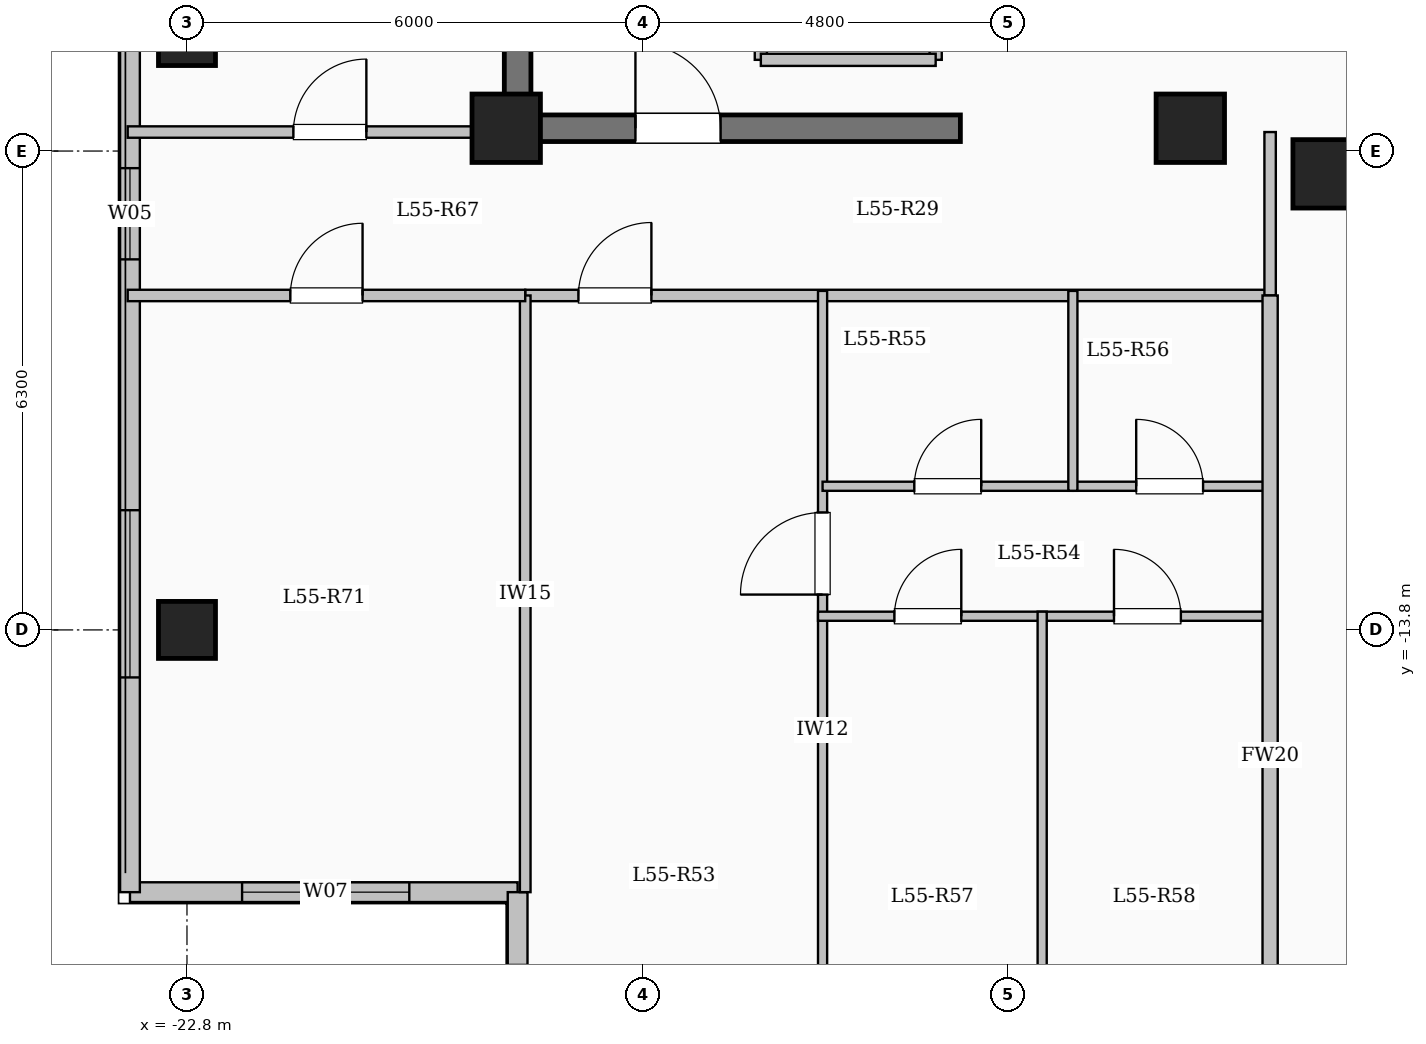
"""IFC4 building model, lengths in metres.
Left out: names, types, materials, properties, quantities, classifications, styles, units other than length and angle.
Written with IfcOpenShell. Run it as: python <this file> out.ifc"""

import sys

from ifc_helpers import new_model, si_unit, direction, frame, frame_2d, origin, origin_2d, place, context, subcontext, project, spatial, rectangle, extrude, element, fill, save


model = new_model("IFC4")
c1 = context("Model", 3, precision=1e-05, world=origin(), true_north=direction((0.0, 1.0)))
c2 = subcontext(c1, "Body", "Model", "MODEL_VIEW")
j1 = project(units=[si_unit("LENGTHUNIT", "METRE"), si_unit("PLANEANGLEUNIT", "RADIAN")], contexts=[c1])
p1 = place(None, origin())
s1 = spatial("IfcSite", under=j1, at=p1, CompositionType="ELEMENT")
p2 = place(p1, origin())
s2 = spatial("IfcBuilding", under=s1, at=p2, CompositionType="ELEMENT")
p3 = place(p2, frame((0.0, 0.0, 203.65)))
s3 = spatial("IfcBuildingStorey", under=s2, at=p3, CompositionType="ELEMENT", Elevation=203.65)
for number, where, z_axis, x_axis in (
    (1, (-7.8, -7.8, 0.0), (0.0, 0.0, 1.0), (1.0, 0.0, 0.0)),
    (2, (-9.6, -7.2, 0.0), (0.0, 0.0, 1.0), (1.0, 0.0, 0.0)),
    (3, (-18.6, -7.2, 0.0), (0.0, 0.0, 1.0), (1.0, 0.0, 0.0)),
):
    element("IfcColumn", number, at=place(p3, frame(where, z_axis=z_axis, x_axis=x_axis)), inside=s3, PredefinedType="COLUMN", context=c2, shape_type="SweptSolid", body=[
        extrude(rectangle(XDim=0.9, YDim=0.9, at=origin_2d()), origin(), (0.0, 0.0, 1.0), 3.35),
    ])
for number, where, z_axis, x_axis in (
    (4, (-22.8, -13.8, 0.0), (0.0, 0.0, 1.0), (1.0, 0.0, 0.0)),
    (5, (-22.8, -6.0, 0.0), (0.0, 0.0, 1.0), (1.0, 0.0, 0.0)),
):
    element("IfcColumn", number, at=place(p3, frame(where, z_axis=z_axis, x_axis=x_axis)), inside=s3, PredefinedType="COLUMN", context=c2, shape_type="SweptSolid", body=[
        extrude(rectangle(XDim=0.75, YDim=0.75, at=origin_2d()), origin(), (0.0, 0.0, 1.0), 3.35),
    ])
p4 = place(p3, frame((-18.45, -17.25, 0.0), z_axis=(0.0, 0.0, 1.0), x_axis=(-1.0, 0.0, 0.0)))
e6 = element("IfcWall", 6, at=p4, inside=s3, PredefinedType="SOLIDWALL", context=c2, shape_type="SweptSolid", body=[
    extrude(rectangle(XDim=5.1, YDim=0.26, at=frame_2d((2.55, 0.0))), origin(), (0.0, 0.0, 1.0), 3.1),
])
p5 = place(p4, frame((1.425, 0.0, 0.9)))
e7 = element("IfcOpeningElement", 7, at=p5, cuts=e6, PredefinedType="OPENING", context=c2, shape_type="SweptSolid", body=[
    extrude(rectangle(XDim=2.2, YDim=1.75, at=frame_2d((1.1, 0.875))), frame((0.0, 0.14, 0.0), z_axis=(0.0, -1.0, 0.0), x_axis=(1.0, 0.0, 0.0)), (0.0, 0.0, 1.0), 0.28),
])
p6 = place(p3, frame((-23.55, -17.25, 0.0), z_axis=(0.0, 0.0, 1.0), x_axis=(0.0, 1.0, 0.0)))
e8 = element("IfcWall", 8, at=p6, inside=s3, PredefinedType="SOLIDWALL", context=c2, shape_type="SweptSolid", body=[
    extrude(rectangle(XDim=34.5, YDim=0.26, at=frame_2d((17.25, 0.0))), origin(), (0.0, 0.0, 1.0), 3.1),
])
p7 = place(p6, frame((2.825, 0.0, 0.9)))
e9 = element("IfcOpeningElement", 9, at=p7, cuts=e8, PredefinedType="OPENING", context=c2, shape_type="SweptSolid", body=[
    extrude(rectangle(XDim=2.2, YDim=1.75, at=frame_2d((1.1, 0.875))), frame((0.0, 0.14, 0.0), z_axis=(0.0, -1.0, 0.0), x_axis=(1.0, 0.0, 0.0)), (0.0, 0.0, 1.0), 0.28),
])
p8 = place(p6, frame((8.325, 0.0, 0.95)))
e10 = element("IfcOpeningElement", 10, at=p8, cuts=e8, PredefinedType="OPENING", context=c2, shape_type="SweptSolid", body=[
    extrude(rectangle(XDim=1.2, YDim=1.5, at=frame_2d((0.6, 0.75))), frame((0.0, 0.14, 0.0), z_axis=(0.0, -1.0, 0.0), x_axis=(1.0, 0.0, 0.0)), (0.0, 0.0, 1.0), 0.28),
])
p9 = place(p6, frame((13.25, 0.0, 0.9)))
e11 = element("IfcOpeningElement", 11, at=p9, cuts=e8, PredefinedType="OPENING", context=c2, shape_type="SweptSolid", body=[
    extrude(rectangle(XDim=2.2, YDim=1.75, at=frame_2d((1.1, 0.875))), frame((0.0, 0.14, 0.0), z_axis=(0.0, -1.0, 0.0), x_axis=(1.0, 0.0, 0.0)), (0.0, 0.0, 1.0), 0.28),
])
p10 = place(p6, frame((19.65, 0.0, 0.9)))
e12 = element("IfcOpeningElement", 12, at=p10, cuts=e8, PredefinedType="OPENING", context=c2, shape_type="SweptSolid", body=[
    extrude(rectangle(XDim=1.65, YDim=1.6, at=frame_2d((0.825, 0.8))), frame((0.0, 0.14, 0.0), z_axis=(0.0, -1.0, 0.0), x_axis=(1.0, 0.0, 0.0)), (0.0, 0.0, 1.0), 0.28),
])
p11 = place(p6, frame((24.125, 0.0, 0.9)))
e13 = element("IfcOpeningElement", 13, at=p11, cuts=e8, PredefinedType="OPENING", context=c2, shape_type="SweptSolid", body=[
    extrude(rectangle(XDim=2.0, YDim=1.7, at=frame_2d((1.0, 0.85))), frame((0.0, 0.14, 0.0), z_axis=(0.0, -1.0, 0.0), x_axis=(1.0, 0.0, 0.0)), (0.0, 0.0, 1.0), 0.28),
])
p12 = place(p6, frame((28.375, 0.0, 0.95)))
e14 = element("IfcOpeningElement", 14, at=p12, cuts=e8, PredefinedType="OPENING", context=c2, shape_type="SweptSolid", body=[
    extrude(rectangle(XDim=1.0, YDim=1.5, at=frame_2d((0.5, 0.75))), frame((0.0, 0.14, 0.0), z_axis=(0.0, -1.0, 0.0), x_axis=(1.0, 0.0, 0.0)), (0.0, 0.0, 1.0), 0.28),
])
p13 = place(p6, frame((31.125, 0.0, 0.9)))
e15 = element("IfcOpeningElement", 15, at=p13, cuts=e8, PredefinedType="OPENING", context=c2, shape_type="SweptSolid", body=[
    extrude(rectangle(XDim=2.0, YDim=1.7, at=frame_2d((1.0, 0.85))), frame((0.0, 0.14, 0.0), z_axis=(0.0, -1.0, 0.0), x_axis=(1.0, 0.0, 0.0)), (0.0, 0.0, 1.0), 0.28),
])
p14 = place(p3, frame((-18.45, -20.85, 0.0), z_axis=(0.0, 0.0, 1.0), x_axis=(0.0, 1.0, 0.0)))
e16 = element("IfcWall", 16, at=p14, inside=s3, PredefinedType="SOLIDWALL", context=c2, shape_type="SweptSolid", body=[
    extrude(rectangle(XDim=3.6, YDim=0.26, at=frame_2d((1.8, 0.0))), origin(), (0.0, 0.0, 1.0), 3.1),
])
p15 = place(p14, frame((0.992, 0.0, 0.9)))
e17 = element("IfcOpeningElement", 17, at=p15, cuts=e16, PredefinedType="OPENING", context=c2, shape_type="SweptSolid", body=[
    extrude(rectangle(XDim=1.65, YDim=1.6, at=frame_2d((0.825, 0.8))), frame((0.0, 0.14, 0.0), z_axis=(0.0, -1.0, 0.0), x_axis=(1.0, 0.0, 0.0)), (0.0, 0.0, 1.0), 0.28),
])
p16 = place(p3, frame((-15.25, -6.3, 0.0), z_axis=(0.0, 0.0, 1.0), x_axis=(0.0, 1.0, 0.0)))
e18 = element("IfcWall", 18, at=p16, inside=s3, PredefinedType="SOLIDWALL", context=c2, shape_type="SweptSolid", body=[
    extrude(rectangle(XDim=2.6, YDim=0.16, at=frame_2d((1.3, 0.0))), origin(), (0.0, 0.0, 1.0), 3.1),
])
p17 = place(p16, frame((0.75, 0.0, 0.0)))
e19 = element("IfcOpeningElement", 19, at=p17, cuts=e18, PredefinedType="OPENING", context=c2, shape_type="SweptSolid", body=[
    extrude(rectangle(XDim=1.1, YDim=2.15, at=frame_2d((0.55, 1.075))), frame((0.0, 0.09, 0.0), z_axis=(0.0, -1.0, 0.0), x_axis=(1.0, 0.0, 0.0)), (0.0, 0.0, 1.0), 0.18),
])
p18 = place(p3, frame((-12.95, -6.3, 0.0), z_axis=(0.0, 0.0, 1.0), x_axis=(0.0, 1.0, 0.0)))
e20 = element("IfcWall", 20, at=p18, inside=s3, PredefinedType="SOLIDWALL", context=c2, shape_type="SweptSolid", body=[
    extrude(rectangle(XDim=2.6, YDim=0.16, at=frame_2d((1.3, 0.0))), origin(), (0.0, 0.0, 1.0), 3.1),
])
p19 = place(p3, frame((-15.25, -6.3, 0.0), z_axis=(0.0, 0.0, 1.0), x_axis=(1.0, 0.0, 0.0)))
e21 = element("IfcWall", 21, at=p19, inside=s3, PredefinedType="SOLIDWALL", context=c2, shape_type="SweptSolid", body=[
    extrude(rectangle(XDim=2.3, YDim=0.16, at=frame_2d((1.15, 0.0))), origin(), (0.0, 0.0, 1.0), 3.1),
])
p20 = place(p3, frame((-18.45, -7.375, 0.0), z_axis=(0.0, 0.0, 1.0), x_axis=(0.0, 1.0, 0.0)))
e22 = element("IfcWall", 22, at=p20, inside=s3, PredefinedType="SHEAR", context=c2, shape_type="SweptSolid", body=[
    extrude(rectangle(XDim=14.05, YDim=0.35, at=frame_2d((7.025, 0.0))), origin(), (0.0, 0.0, 1.0), 3.35),
])
p21 = place(p3, frame((-18.625, -7.2, 0.0), z_axis=(0.0, 0.0, 1.0), x_axis=(1.0, 0.0, 0.0)))
e23 = element("IfcWall", 23, at=p21, inside=s3, PredefinedType="SHEAR", context=c2, shape_type="SweptSolid", body=[
    extrude(rectangle(XDim=6.0, YDim=0.35, at=frame_2d((3.0, 0.0))), origin(), (0.0, 0.0, 1.0), 3.35),
])
p22 = place(p21, frame((1.725, 0.0, 0.0)))
e24 = element("IfcOpeningElement", 24, at=p22, cuts=e23, PredefinedType="OPENING", context=c2, shape_type="SweptSolid", body=[
    extrude(rectangle(XDim=1.12, YDim=2.15, at=frame_2d((0.56, 1.075))), frame((0.0, 0.185, 0.0), z_axis=(0.0, -1.0, 0.0), x_axis=(1.0, 0.0, 0.0)), (0.0, 0.0, 1.0), 0.37),
])
p23 = place(p3, frame((-18.35, -9.4, 0.0), z_axis=(0.0, 0.0, 1.0), x_axis=(1.0, 0.0, 0.0)))
e25 = element("IfcWall", 25, at=p23, inside=s3, PredefinedType="PARTITIONING", context=c2, shape_type="SweptSolid", body=[
    extrude(rectangle(XDim=9.8, YDim=0.15, at=frame_2d((4.9, 0.0))), origin(), (0.0, 0.0, 1.0), 3.1),
])
p24 = place(p23, frame((0.7, 0.0, 0.0)))
e26 = element("IfcOpeningElement", 26, at=p24, cuts=e25, PredefinedType="OPENING", context=c2, shape_type="SweptSolid", body=[
    extrude(rectangle(XDim=0.96, YDim=2.15, at=frame_2d((0.48, 1.075))), frame((0.0, 0.085, 0.0), z_axis=(0.0, -1.0, 0.0), x_axis=(1.0, 0.0, 0.0)), (0.0, 0.0, 1.0), 0.17),
])
p25 = place(p3, frame((-8.55, -9.4, 0.0), z_axis=(0.0, 0.0, 1.0), x_axis=(0.0, 1.0, 0.0)))
e27 = element("IfcWall", 27, at=p25, inside=s3, PredefinedType="PARTITIONING", context=c2, shape_type="SweptSolid", body=[
    extrude(rectangle(XDim=2.15, YDim=0.15, at=frame_2d((1.075, 0.0))), origin(), (0.0, 0.0, 1.0), 3.1),
])
p26 = place(p3, frame((-14.438, -20.9, 0.0), z_axis=(0.0, 0.0, 1.0), x_axis=(0.0, 1.0, 0.0)))
e28 = element("IfcWall", 28, at=p26, inside=s3, PredefinedType="PARTITIONING", context=c2, shape_type="SweptSolid", body=[
    extrude(rectangle(XDim=11.56, YDim=0.12, at=frame_2d((5.78, 0.0))), origin(), (0.0, 0.0, 1.0), 3.1),
])
p27 = place(p26, frame((7.565, 0.0, 0.0)))
e29 = element("IfcOpeningElement", 29, at=p27, cuts=e28, PredefinedType="OPENING", context=c2, shape_type="SweptSolid", body=[
    extrude(rectangle(XDim=1.08, YDim=2.15, at=frame_2d((0.54, 1.075))), frame((0.0, 0.07, 0.0), z_axis=(0.0, -1.0, 0.0), x_axis=(1.0, 0.0, 0.0)), (0.0, 0.0, 1.0), 0.14),
])
p28 = place(p3, frame((-14.438, -11.91, 0.0), z_axis=(0.0, 0.0, 1.0), x_axis=(1.0, 0.0, 0.0)))
e30 = element("IfcWall", 30, at=p28, inside=s3, PredefinedType="PARTITIONING", context=c2, shape_type="SweptSolid", body=[
    extrude(rectangle(XDim=3.293, YDim=0.12, at=frame_2d((1.646, 0.0))), origin(), (0.0, 0.0, 1.0), 3.1),
])
p29 = place(p28, frame((1.207, 0.0, 0.0)))
e31 = element("IfcOpeningElement", 31, at=p29, cuts=e30, PredefinedType="OPENING", context=c2, shape_type="SweptSolid", body=[
    extrude(rectangle(XDim=0.88, YDim=2.1, at=frame_2d((0.44, 1.05))), frame((0.0, 0.07, 0.0), z_axis=(0.0, -1.0, 0.0), x_axis=(1.0, 0.0, 0.0)), (0.0, 0.0, 1.0), 0.14),
])
p30 = place(p3, frame((-11.145, -11.91, 0.0), z_axis=(0.0, 0.0, 1.0), x_axis=(1.0, 0.0, 0.0)))
e32 = element("IfcWall", 32, at=p30, inside=s3, PredefinedType="PARTITIONING", context=c2, shape_type="SweptSolid", body=[
    extrude(rectangle(XDim=2.545, YDim=0.12, at=frame_2d((1.272, 0.0))), origin(), (0.0, 0.0, 1.0), 3.1),
])
p31 = place(p30, frame((0.833, 0.0, 0.0)))
e33 = element("IfcOpeningElement", 33, at=p31, cuts=e32, PredefinedType="OPENING", context=c2, shape_type="SweptSolid", body=[
    extrude(rectangle(XDim=0.88, YDim=2.1, at=frame_2d((0.44, 1.05))), frame((0.0, 0.07, 0.0), z_axis=(0.0, -1.0, 0.0), x_axis=(1.0, 0.0, 0.0)), (0.0, 0.0, 1.0), 0.14),
])
p32 = place(p3, frame((-14.498, -13.62, 0.0), z_axis=(0.0, 0.0, 1.0), x_axis=(1.0, 0.0, 0.0)))
e34 = element("IfcWall", 34, at=p32, inside=s3, PredefinedType="PARTITIONING", context=c2, shape_type="SweptSolid", body=[
    extrude(rectangle(XDim=5.958, YDim=0.12, at=frame_2d((2.979, 0.0))), origin(), (0.0, 0.0, 1.0), 3.1),
])
p33 = place(p32, frame((1.005, 0.0, 0.0)))
e35 = element("IfcOpeningElement", 35, at=p33, cuts=e34, PredefinedType="OPENING", context=c2, shape_type="SweptSolid", body=[
    extrude(rectangle(XDim=0.88, YDim=2.1, at=frame_2d((0.44, 1.05))), frame((0.0, 0.07, 0.0), z_axis=(0.0, -1.0, 0.0), x_axis=(1.0, 0.0, 0.0)), (0.0, 0.0, 1.0), 0.14),
])
p34 = place(p32, frame((3.894, 0.0, 0.0)))
e36 = element("IfcOpeningElement", 36, at=p34, cuts=e34, PredefinedType="OPENING", context=c2, shape_type="SweptSolid", body=[
    extrude(rectangle(XDim=0.88, YDim=2.1, at=frame_2d((0.44, 1.05))), frame((0.0, 0.07, 0.0), z_axis=(0.0, -1.0, 0.0), x_axis=(1.0, 0.0, 0.0)), (0.0, 0.0, 1.0), 0.14),
])
p35 = place(p3, frame((-11.145, -11.97, 0.0), z_axis=(0.0, 0.0, 1.0), x_axis=(0.0, 1.0, 0.0)))
e37 = element("IfcWall", 37, at=p35, inside=s3, PredefinedType="PARTITIONING", context=c2, shape_type="SweptSolid", body=[
    extrude(rectangle(XDim=2.63, YDim=0.12, at=frame_2d((1.315, 0.0))), origin(), (0.0, 0.0, 1.0), 3.1),
])
p36 = place(p3, frame((-11.549, -20.9, 0.0), z_axis=(0.0, 0.0, 1.0), x_axis=(0.0, 1.0, 0.0)))
e38 = element("IfcWall", 38, at=p36, inside=s3, PredefinedType="PARTITIONING", context=c2, shape_type="SweptSolid", body=[
    extrude(rectangle(XDim=7.34, YDim=0.12, at=frame_2d((3.67, 0.0))), origin(), (0.0, 0.0, 1.0), 3.1),
])
p37 = place(p3, frame((-8.55, -21.504, 0.0), z_axis=(0.0, 0.0, 1.0), x_axis=(0.0, 1.0, 0.0)))
e39 = element("IfcWall", 39, at=p37, inside=s3, PredefinedType="SOLIDWALL", context=c2, shape_type="SweptSolid", body=[
    extrude(rectangle(XDim=12.104, YDim=0.2, at=frame_2d((6.052, 0.0))), origin(), (0.0, 0.0, 1.0), 3.1),
])
p38 = place(p3, frame((-23.58, -7.25, 0.0), z_axis=(0.0, 0.0, 1.0), x_axis=(1.0, 0.0, 0.0)))
e40 = element("IfcWall", 40, at=p38, inside=s3, PredefinedType="PARTITIONING", context=c2, shape_type="SweptSolid", body=[
    extrude(rectangle(XDim=5.13, YDim=0.15, at=frame_2d((2.565, 0.0))), origin(), (0.0, 0.0, 1.0), 3.1),
])
p39 = place(p38, frame((2.18, 0.0, 0.0)))
e41 = element("IfcOpeningElement", 41, at=p39, cuts=e40, PredefinedType="OPENING", context=c2, shape_type="SweptSolid", body=[
    extrude(rectangle(XDim=0.96, YDim=2.15, at=frame_2d((0.48, 1.075))), frame((0.0, 0.085, 0.0), z_axis=(0.0, -1.0, 0.0), x_axis=(1.0, 0.0, 0.0)), (0.0, 0.0, 1.0), 0.17),
])
p40 = place(p3, frame((-18.35, -17.25, 0.0), z_axis=(0.0, 0.0, 1.0), x_axis=(0.0, 1.0, 0.0)))
e42 = element("IfcWall", 42, at=p40, inside=s3, PredefinedType="PARTITIONING", context=c2, shape_type="SweptSolid", body=[
    extrude(rectangle(XDim=7.85, YDim=0.14, at=frame_2d((3.925, 0.0))), origin(), (0.0, 0.0, 1.0), 3.1),
])
p41 = place(p3, frame((-23.58, -9.4, 0.0), z_axis=(0.0, 0.0, 1.0), x_axis=(1.0, 0.0, 0.0)))
e43 = element("IfcWall", 43, at=p41, inside=s3, PredefinedType="PARTITIONING", context=c2, shape_type="SweptSolid", body=[
    extrude(rectangle(XDim=5.23, YDim=0.15, at=frame_2d((2.615, 0.0))), origin(), (0.0, 0.0, 1.0), 3.1),
])
p42 = place(p41, frame((2.14, 0.0, 0.0)))
e44 = element("IfcOpeningElement", 44, at=p42, cuts=e43, PredefinedType="OPENING", context=c2, shape_type="SweptSolid", body=[
    extrude(rectangle(XDim=0.95, YDim=2.15, at=frame_2d((0.475, 1.075))), frame((0.0, 0.085, 0.0), z_axis=(0.0, -1.0, 0.0), x_axis=(1.0, 0.0, 0.0)), (0.0, 0.0, 1.0), 0.17),
])
p43 = place(p5, origin())
e45 = element("IfcWindow", 45, at=p43, inside=s3, PartitioningType="SINGLE_PANEL", PredefinedType="WINDOW", context=c2, shape_type="SweptSolid", body=[
    extrude(rectangle(XDim=2.2, YDim=1.75, at=frame_2d((1.1, 0.875))), frame((0.0, 0.03, 0.0), z_axis=(0.0, -1.0, 0.0), x_axis=(1.0, 0.0, 0.0)), (0.0, 0.0, 1.0), 0.06),
])
fill(e7, e45)
p44 = place(p7, origin())
e46 = element("IfcWindow", 46, at=p44, inside=s3, PartitioningType="SINGLE_PANEL", PredefinedType="WINDOW", context=c2, shape_type="SweptSolid", body=[
    extrude(rectangle(XDim=2.2, YDim=1.75, at=frame_2d((1.1, 0.875))), frame((0.0, 0.03, 0.0), z_axis=(0.0, -1.0, 0.0), x_axis=(1.0, 0.0, 0.0)), (0.0, 0.0, 1.0), 0.06),
])
fill(e9, e46)
p45 = place(p8, origin())
e47 = element("IfcWindow", 47, at=p45, inside=s3, PartitioningType="SINGLE_PANEL", PredefinedType="WINDOW", context=c2, shape_type="SweptSolid", body=[
    extrude(rectangle(XDim=1.2, YDim=1.5, at=frame_2d((0.6, 0.75))), frame((0.0, 0.03, 0.0), z_axis=(0.0, -1.0, 0.0), x_axis=(1.0, 0.0, 0.0)), (0.0, 0.0, 1.0), 0.06),
])
fill(e10, e47)
p46 = place(p22, origin())
e48 = element("IfcDoor", 48, at=p46, inside=s3, OperationType="SINGLE_SWING_LEFT", PredefinedType="DOOR", context=c2, shape_type="SweptSolid", body=[
    extrude(rectangle(XDim=1.12, YDim=2.15, at=frame_2d((0.56, 1.075))), frame((0.0, 0.025, 0.0), z_axis=(0.0, -1.0, 0.0), x_axis=(1.0, 0.0, 0.0)), (0.0, 0.0, 1.0), 0.05),
])
fill(e24, e48)
p47 = place(p24, origin())
e49 = element("IfcDoor", 49, at=p47, inside=s3, OperationType="SINGLE_SWING_RIGHT", PredefinedType="DOOR", context=c2, shape_type="SweptSolid", body=[
    extrude(rectangle(XDim=0.96, YDim=2.15, at=frame_2d((0.48, 1.075))), frame((0.0, 0.025, 0.0), z_axis=(0.0, -1.0, 0.0), x_axis=(1.0, 0.0, 0.0)), (0.0, 0.0, 1.0), 0.05),
])
fill(e26, e49)
p48 = place(p27, origin())
e50 = element("IfcDoor", 50, at=p48, inside=s3, OperationType="SINGLE_SWING_LEFT", PredefinedType="DOOR", context=c2, shape_type="SweptSolid", body=[
    extrude(rectangle(XDim=1.08, YDim=2.15, at=frame_2d((0.54, 1.075))), frame((0.0, 0.025, 0.0), z_axis=(0.0, -1.0, 0.0), x_axis=(1.0, 0.0, 0.0)), (0.0, 0.0, 1.0), 0.05),
])
fill(e29, e50)
p49 = place(p29, origin())
e51 = element("IfcDoor", 51, at=p49, inside=s3, OperationType="SINGLE_SWING_RIGHT", PredefinedType="DOOR", context=c2, shape_type="SweptSolid", body=[
    extrude(rectangle(XDim=0.88, YDim=2.1, at=frame_2d((0.44, 1.05))), frame((0.0, 0.025, 0.0), z_axis=(0.0, -1.0, 0.0), x_axis=(1.0, 0.0, 0.0)), (0.0, 0.0, 1.0), 0.05),
])
fill(e31, e51)
p50 = place(p31, origin())
e52 = element("IfcDoor", 52, at=p50, inside=s3, OperationType="SINGLE_SWING_LEFT", PredefinedType="DOOR", context=c2, shape_type="SweptSolid", body=[
    extrude(rectangle(XDim=0.88, YDim=2.1, at=frame_2d((0.44, 1.05))), frame((0.0, 0.025, 0.0), z_axis=(0.0, -1.0, 0.0), x_axis=(1.0, 0.0, 0.0)), (0.0, 0.0, 1.0), 0.05),
])
fill(e33, e52)
p51 = place(p33, origin())
e53 = element("IfcDoor", 53, at=p51, inside=s3, OperationType="SINGLE_SWING_RIGHT", PredefinedType="DOOR", context=c2, shape_type="SweptSolid", body=[
    extrude(rectangle(XDim=0.88, YDim=2.1, at=frame_2d((0.44, 1.05))), frame((0.0, 0.025, 0.0), z_axis=(0.0, -1.0, 0.0), x_axis=(1.0, 0.0, 0.0)), (0.0, 0.0, 1.0), 0.05),
])
fill(e35, e53)
p52 = place(p34, origin())
e54 = element("IfcDoor", 54, at=p52, inside=s3, OperationType="SINGLE_SWING_LEFT", PredefinedType="DOOR", context=c2, shape_type="SweptSolid", body=[
    extrude(rectangle(XDim=0.88, YDim=2.1, at=frame_2d((0.44, 1.05))), frame((0.0, 0.025, 0.0), z_axis=(0.0, -1.0, 0.0), x_axis=(1.0, 0.0, 0.0)), (0.0, 0.0, 1.0), 0.05),
])
fill(e36, e54)
p53 = place(p42, origin())
e55 = element("IfcDoor", 55, at=p53, inside=s3, OperationType="SINGLE_SWING_RIGHT", PredefinedType="DOOR", context=c2, shape_type="SweptSolid", body=[
    extrude(rectangle(XDim=0.95, YDim=2.15, at=frame_2d((0.475, 1.075))), frame((0.0, 0.025, 0.0), z_axis=(0.0, -1.0, 0.0), x_axis=(1.0, 0.0, 0.0)), (0.0, 0.0, 1.0), 0.05),
])
fill(e44, e55)
p54 = place(p39, origin())
e56 = element("IfcDoor", 56, at=p54, inside=s3, OperationType="SINGLE_SWING_RIGHT", PredefinedType="DOOR", context=c2, shape_type="SweptSolid", body=[
    extrude(rectangle(XDim=0.96, YDim=2.15, at=frame_2d((0.48, 1.075))), frame((0.0, 0.025, 0.0), z_axis=(0.0, -1.0, 0.0), x_axis=(1.0, 0.0, 0.0)), (0.0, 0.0, 1.0), 0.05),
])
fill(e41, e56)
save(model, sys.argv[1])
